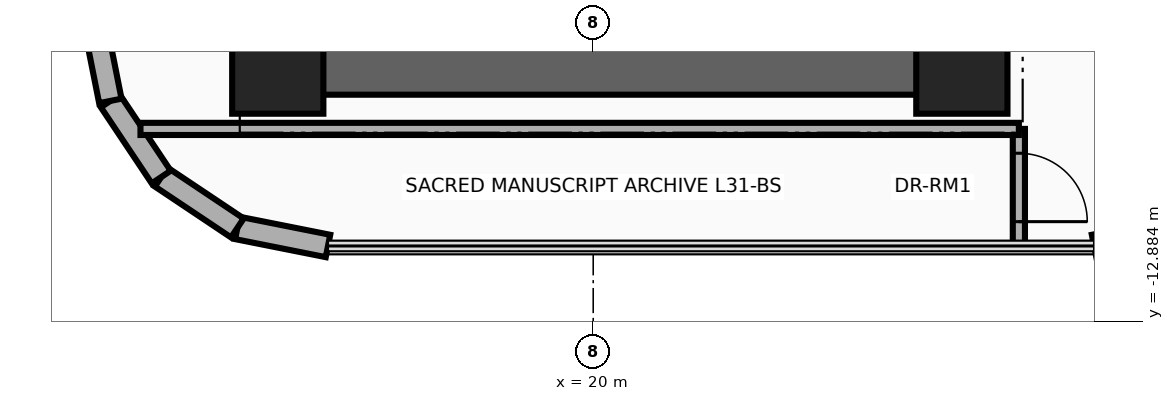
"""IFC4 building model, lengths in metres.
Left out: names, types, materials, properties, quantities, classifications, styles, units other than length and angle.
Written with IfcOpenShell. Run it as: python <this file> out.ifc"""

import sys

from ifc_helpers import new_model, si_unit, direction, frame, frame_2d, origin, origin_2d, place, context, subcontext, project, spatial, rectangle, extrude, source, transform, mapped, element, fill, save


model = new_model("IFC4")
c1 = context("Model", 3, precision=1e-05, world=origin(), true_north=direction((0.0, 1.0)))
c2 = subcontext(c1, "Body", "Model", "MODEL_VIEW")
j1 = project(units=[si_unit("LENGTHUNIT", "METRE"), si_unit("PLANEANGLEUNIT", "RADIAN")], contexts=[c1])
p1 = place(None, origin())
s1 = spatial("IfcSite", under=j1, at=p1, CompositionType="ELEMENT")
p2 = place(p1, origin())
s2 = spatial("IfcBuilding", under=s1, at=p2, CompositionType="ELEMENT")
p3 = place(p2, frame((0.0, 0.0, 124.2)))
s3 = spatial("IfcBuildingStorey", under=s2, at=p3, CompositionType="ELEMENT", Elevation=124.2)
p4 = place(p3, frame((24.85, -9.9, 0.0), z_axis=(0.0, 0.0, 1.0), x_axis=(0.0, 1.0, 0.0)))
e1 = element("IfcWall", 1, at=p4, inside=s3, PredefinedType="SHEAR", context=c2, shape_type="SweptSolid", body=[
    extrude(rectangle(XDim=8.95, YDim=0.7, at=frame_2d((4.475, 0.0))), origin(), (0.0, 0.0, 1.0), 3.46),
])
p5 = place(p3, frame((15.85, -9.55, 0.0), z_axis=(0.0, 0.0, 1.0), x_axis=(1.0, 0.0, 0.0)))
e2 = element("IfcWall", 2, at=p5, inside=s3, PredefinedType="SHEAR", context=c2, shape_type="SweptSolid", body=[
    extrude(rectangle(XDim=9.0, YDim=0.7, at=frame_2d((4.5, 0.0))), origin(), (0.0, 0.0, 1.0), 3.46),
])
m1 = source(origin(), c2, "Body", "SweptSolid", [
    extrude(rectangle(XDim=1.2, YDim=1.2, at=origin_2d()), origin(), (0.0, 0.0, 1.0), 3.7),
])
for number, where, z_axis, x_axis in (
    (3, (15.85, -9.55, 0.0), (0.0, 0.0, 1.0), (1.0, 0.0, 0.0)),
    (4, (24.85, -9.55, 0.0), (0.0, 0.0, 1.0), (1.0, 0.0, 0.0)),
):
    element("IfcColumn", number, at=place(p3, frame(where, z_axis=z_axis, x_axis=x_axis)), inside=s3, PredefinedType="COLUMN", context=c2, shape_type="MappedRepresentation", body=[
        mapped(m1, transform((0.0, 0.0, 0.0), x_axis=(1.0, 0.0, 0.0), y_axis=(0.0, 1.0, 0.0), z_axis=(0.0, 0.0, 1.0), scale=1.0)),
    ])
p6 = place(p3, frame((27.782, -11.653, 0.0), z_axis=(0.0, 0.0, 1.0), x_axis=(-0.980811661072, -0.194957650543, 0.0)))
e5 = element("IfcWall", 5, at=p6, inside=s3, PredefinedType="SOLIDWALL", context=c2, shape_type="SweptSolid", body=[
    extrude(rectangle(XDim=1.216, YDim=0.3, at=frame_2d((0.608, 0.0))), origin(), (0.0, 0.0, 1.0), 3.46),
])
p7 = place(p3, frame((16.511, -11.89, 0.0), z_axis=(0.0, 0.0, 1.0), x_axis=(-0.980804027463, 0.194996050505, 0.0)))
e6 = element("IfcWall", 6, at=p7, inside=s3, PredefinedType="SOLIDWALL", context=c2, shape_type="SweptSolid", body=[
    extrude(rectangle(XDim=1.216, YDim=0.3, at=frame_2d((0.608, 0.0))), origin(), (0.0, 0.0, 1.0), 3.46),
])
for number, where, z_axis, x_axis in (
    (7, (15.318, -11.653, 0.0), (0.0, 0.0, 1.0), (-0.831, 0.556, 0.0)),
    (8, (14.317, -10.983, 0.0), (0.0, 0.0, 1.0), (-0.556, 0.831, 0.0)),
):
    element("IfcWall", number, at=place(p3, frame(where, z_axis=z_axis, x_axis=x_axis)), inside=s3, PredefinedType="SOLIDWALL", context=c2, shape_type="SweptSolid", body=[
        extrude(rectangle(XDim=1.205, YDim=0.3, at=frame_2d((0.603, 0.0))), origin(), (0.0, 0.0, 1.0), 3.46),
    ])
p8 = place(p3, frame((13.647, -9.982, 0.0), z_axis=(0.0, 0.0, 1.0), x_axis=(-0.195189223115, 0.980765602568, 0.0)))
e9 = element("IfcWall", 9, at=p8, inside=s3, PredefinedType="SOLIDWALL", context=c2, shape_type="SweptSolid", body=[
    extrude(rectangle(XDim=1.216, YDim=0.3, at=frame_2d((0.608, 0.0))), origin(), (0.0, 0.0, 1.0), 3.46),
])
p9 = place(p3, frame((25.6, -11.89, 0.0), z_axis=(0.0, 0.0, 1.0), x_axis=(0.0, 1.0, 0.0)))
e10 = element("IfcWall", 10, at=p9, inside=s3, PredefinedType="PARTITIONING", context=c2, shape_type="SweptSolid", body=[
    extrude(rectangle(XDim=1.54, YDim=0.16, at=frame_2d((0.77, 0.0))), origin(), (0.0, 0.0, 1.0), 3.46),
])
p10 = place(p9, frame((0.32, 0.0, 0.0)))
e11 = element("IfcOpeningElement", 11, at=p10, cuts=e10, PredefinedType="OPENING", context=c2, shape_type="SweptSolid", body=[
    extrude(rectangle(XDim=0.9, YDim=2.1, at=frame_2d((0.45, 1.05))), frame((0.0, 0.095, 0.0), z_axis=(0.0, -1.0, 0.0), x_axis=(1.0, 0.0, 0.0)), (0.0, 0.0, 1.0), 0.19),
])
p11 = place(p3, frame((14.044, -10.35, 0.0), z_axis=(0.0, 0.0, 1.0), x_axis=(1.0, 0.0, 0.0)))
e12 = element("IfcWall", 12, at=p11, inside=s3, PredefinedType="PARTITIONING", context=c2, shape_type="SweptSolid", body=[
    extrude(rectangle(XDim=11.556, YDim=0.16, at=frame_2d((5.778, 0.0))), origin(), (0.0, 0.0, 1.0), 3.46),
])
p12 = place(p10, frame((0.9, 0.0, 0.0), z_axis=(0.0, 0.0, 1.0), x_axis=(-1.0, 0.0, 0.0)))
e13 = element("IfcDoor", 13, at=p12, inside=s3, OperationType="SINGLE_SWING_LEFT", PredefinedType="DOOR", context=c2, shape_type="SweptSolid", body=[
    extrude(rectangle(XDim=0.9, YDim=2.1, at=frame_2d((0.45, 1.05))), frame((0.0, 0.025, 0.0), z_axis=(0.0, -1.0, 0.0), x_axis=(1.0, 0.0, 0.0)), (0.0, 0.0, 1.0), 0.05),
])
fill(e11, e13)
save(model, sys.argv[1])
